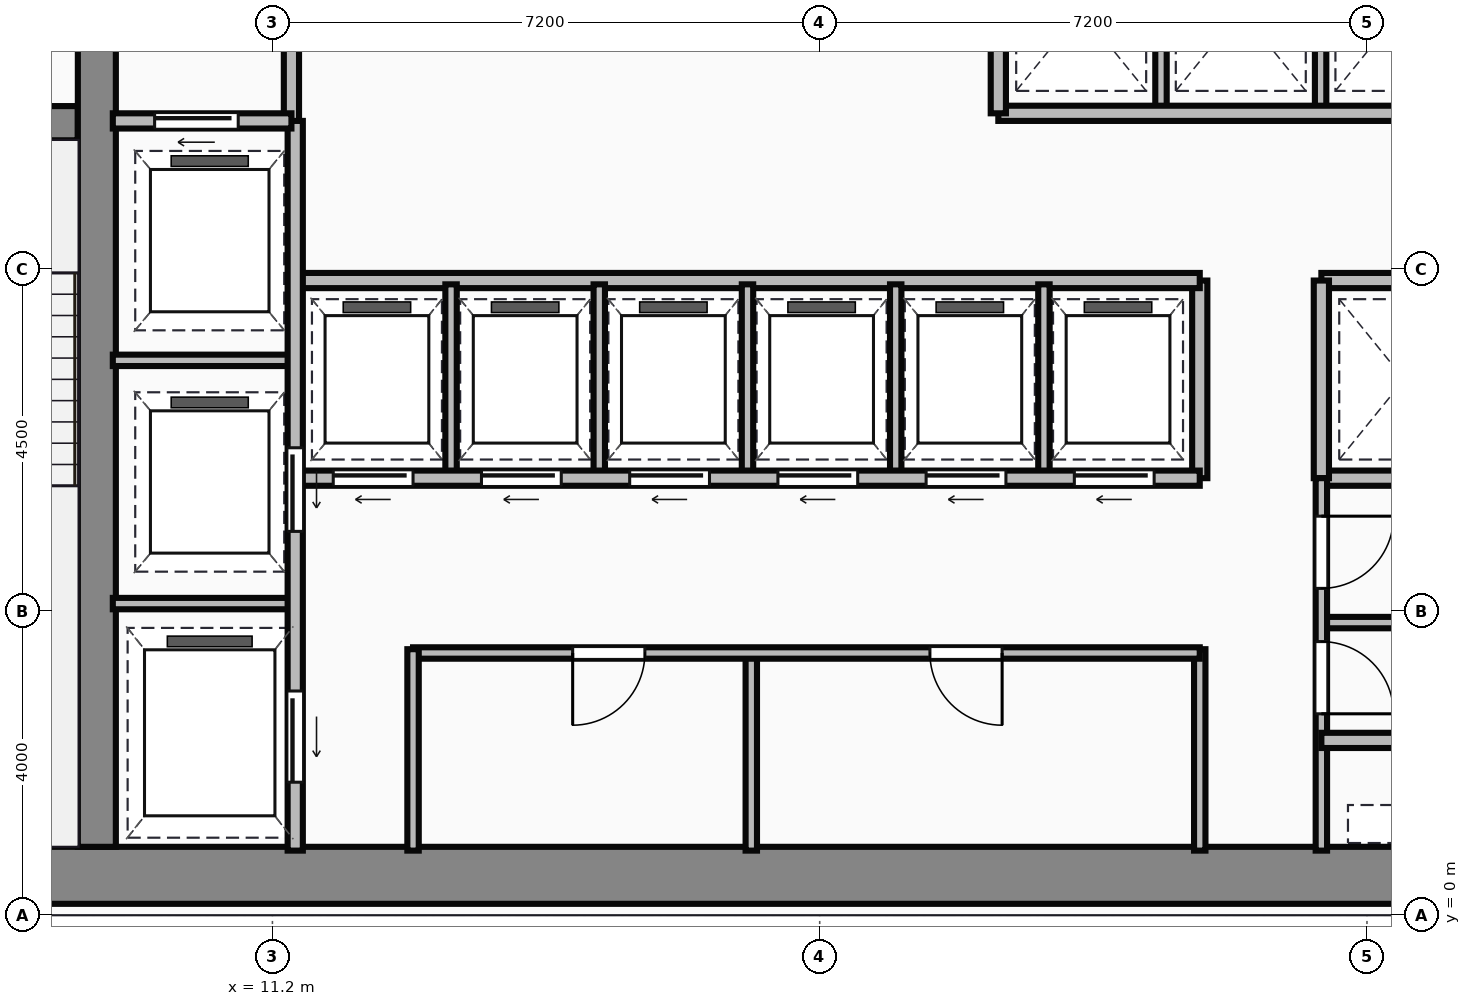
"""IFC4 building model, lengths in metres.
Left out: names, types, materials, properties, quantities, classifications, styles, units other than length and angle.
Written with IfcOpenShell. Run it as: python <this file> out.ifc"""

import sys

from ifc_helpers import new_model, si_unit, direction, frame, frame_2d, origin, place, context, subcontext, project, spatial, rectangle, extrude, source, transform, mapped, element, fill, save


model = new_model("IFC4")
c1 = context("Model", 3, precision=1e-05, world=origin(), true_north=direction((0.0, 1.0)))
c2 = subcontext(c1, "Body", "Model", "MODEL_VIEW")
j1 = project(units=[si_unit("LENGTHUNIT", "METRE"), si_unit("PLANEANGLEUNIT", "RADIAN")], contexts=[c1])
p1 = place(None, origin())
s1 = spatial("IfcSite", under=j1, at=p1, CompositionType="ELEMENT")
p2 = place(p1, origin())
s2 = spatial("IfcBuilding", under=s1, at=p2, CompositionType="ELEMENT")
p3 = place(p2, frame((0.0, 0.0, 95.95)))
s3 = spatial("IfcBuildingStorey", under=s2, at=p3, CompositionType="ELEMENT", Elevation=95.95)
m1 = source(origin(), c2, "Body", "SweptSolid", [
    extrude(rectangle(XDim=29.5, YDim=0.75, at=frame_2d((14.75, 0.0))), origin(), (0.0, 0.0, 1.0), 3.65),
])
p4 = place(p3, frame((4.5, 0.525, 0.0), z_axis=(0.0, 0.0, 1.0), x_axis=(1.0, 0.0, 0.0)))
e1 = element("IfcWall", 1, at=p4, inside=s3, PredefinedType="SHEAR", context=c2, shape_type="MappedRepresentation", body=[
    mapped(m1, transform((0.0, 0.0, 0.0))),
])
m2 = source(origin(), c2, "Body", "SweptSolid", [
    extrude(rectangle(XDim=12.35, YDim=0.5, at=frame_2d((6.175, 0.0))), origin(), (0.0, 0.0, 1.0), 3.65),
])
p5 = place(p3, frame((8.89, 0.9, 0.0), z_axis=(0.0, 0.0, 1.0), x_axis=(0.0, 1.0, 0.0)))
e2 = element("IfcWall", 2, at=p5, inside=s3, PredefinedType="SHEAR", context=c2, shape_type="MappedRepresentation", body=[
    mapped(m2, transform((0.0, 0.0, 0.0))),
])
m3 = source(origin(), c2, "Body", "SweptSolid", [
    extrude(rectangle(XDim=3.39, YDim=0.45, at=frame_2d((1.695, 0.0))), origin(), (0.0, 0.0, 1.0), 3.65),
])
p6 = place(p3, frame((5.25, 10.42, 0.0), z_axis=(0.0, 0.0, 1.0), x_axis=(1.0, 0.0, 0.0)))
e3 = element("IfcWall", 3, at=p6, inside=s3, PredefinedType="SHEAR", context=c2, shape_type="MappedRepresentation", body=[
    mapped(m3, transform((0.0, 0.0, 0.0))),
])
p7 = place(p6, frame((1.05, 0.0, 0.0)))
e4 = element("IfcOpeningElement", 4, at=p7, cuts=e3, PredefinedType="OPENING", context=c2, shape_type="SweptSolid", body=[
    extrude(rectangle(XDim=1.1, YDim=2.15, at=frame_2d((0.55, 1.075))), frame((0.0, 0.235, 0.0), z_axis=(0.0, -1.0, 0.0), x_axis=(1.0, 0.0, 0.0)), (0.0, 0.0, 1.0), 0.47),
])
m4 = source(origin(), c2, "Body", "SweptSolid", [
    extrude(rectangle(XDim=3.18, YDim=0.2, at=frame_2d((1.59, 0.0))), origin(), (0.0, 0.0, 1.0), 3.4),
])
p8 = place(p3, frame((11.45, 10.42, 0.0), z_axis=(0.0, 0.0, 1.0), x_axis=(0.0, 1.0, 0.0)))
e5 = element("IfcWall", 5, at=p8, inside=s3, PredefinedType="PARTITIONING", context=c2, shape_type="MappedRepresentation", body=[
    mapped(m4, transform((0.0, 0.0, 0.0))),
])
m5 = source(origin(), c2, "Body", "SweptSolid", [
    extrude(rectangle(XDim=2.35, YDim=0.2, at=frame_2d((1.175, 0.0))), origin(), (0.0, 0.0, 1.0), 3.4),
])
p9 = place(p3, frame((9.1, 10.45, 0.0), z_axis=(0.0, 0.0, 1.0), x_axis=(1.0, 0.0, 0.0)))
e6 = element("IfcWall", 6, at=p9, inside=s3, PredefinedType="PARTITIONING", context=c2, shape_type="MappedRepresentation", body=[
    mapped(m5, transform((0.0, 0.0, 0.0))),
])
p10 = place(p9, frame((0.55, 0.0, 0.0)))
e7 = element("IfcOpeningElement", 7, at=p10, cuts=e6, PredefinedType="OPENING", context=c2, shape_type="SweptSolid", body=[
    extrude(rectangle(XDim=1.1, YDim=2.15, at=frame_2d((0.55, 1.075))), frame((0.0, 0.11, 0.0), z_axis=(0.0, -1.0, 0.0), x_axis=(1.0, 0.0, 0.0)), (0.0, 0.0, 1.0), 0.22),
])
m6 = source(origin(), c2, "Body", "SweptSolid", [
    extrude(rectangle(XDim=9.6, YDim=0.2, at=frame_2d((4.8, 0.0))), origin(), (0.0, 0.0, 1.0), 3.4),
])
p11 = place(p3, frame((11.5, 0.85, 0.0), z_axis=(0.0, 0.0, 1.0), x_axis=(0.0, 1.0, 0.0)))
e8 = element("IfcWall", 8, at=p11, inside=s3, PredefinedType="PARTITIONING", context=c2, shape_type="MappedRepresentation", body=[
    mapped(m6, transform((0.0, 0.0, 0.0))),
])
p12 = place(p11, frame((4.2, 0.0, 0.0)))
e9 = element("IfcOpeningElement", 9, at=p12, cuts=e8, PredefinedType="OPENING", context=c2, shape_type="SweptSolid", body=[
    extrude(rectangle(XDim=1.1, YDim=2.15, at=frame_2d((0.55, 1.075))), frame((0.0, 0.11, 0.0), z_axis=(0.0, -1.0, 0.0), x_axis=(1.0, 0.0, 0.0)), (0.0, 0.0, 1.0), 0.22),
])
p13 = place(p11, frame((0.9, 0.0, 0.0)))
e10 = element("IfcOpeningElement", 10, at=p13, cuts=e8, PredefinedType="OPENING", context=c2, shape_type="SweptSolid", body=[
    extrude(rectangle(XDim=1.2, YDim=2.15, at=frame_2d((0.6, 1.075))), frame((0.0, 0.11, 0.0), z_axis=(0.0, -1.0, 0.0), x_axis=(1.0, 0.0, 0.0)), (0.0, 0.0, 1.0), 0.22),
])
m7 = source(origin(), c2, "Body", "SweptSolid", [
    extrude(rectangle(XDim=2.4, YDim=0.15, at=frame_2d((1.2, 0.0))), origin(), (0.0, 0.0, 1.0), 3.4),
])
for number, where, z_axis, x_axis in (
    (11, (9.1, 4.1, 0.0), (0.0, 0.0, 1.0), (1.0, 0.0, 0.0)),
    (12, (9.1, 7.3, 0.0), (0.0, 0.0, 1.0), (1.0, 0.0, 0.0)),
):
    element("IfcWall", number, at=place(p3, frame(where, z_axis=z_axis, x_axis=x_axis)), inside=s3, PredefinedType="PARTITIONING", context=c2, shape_type="MappedRepresentation", body=[
        mapped(m7, transform((0.0, 0.0, 0.0))),
    ])
m8 = source(origin(), c2, "Body", "SweptSolid", [
    extrude(rectangle(XDim=2.65, YDim=0.15, at=frame_2d((1.325, 0.0))), origin(), (0.0, 0.0, 1.0), 3.4),
])
p14 = place(p3, frame((13.05, 0.85, 0.0), z_axis=(0.0, 0.0, 1.0), x_axis=(0.0, 1.0, 0.0)))
e13 = element("IfcWall", 13, at=p14, inside=s3, PredefinedType="PARTITIONING", context=c2, shape_type="MappedRepresentation", body=[
    mapped(m8, transform((0.0, 0.0, 0.0))),
])
m9 = source(origin(), c2, "Body", "SweptSolid", [
    extrude(rectangle(XDim=10.35, YDim=0.15, at=frame_2d((5.175, 0.0))), origin(), (0.0, 0.0, 1.0), 3.4),
])
p15 = place(p3, frame((13.05, 3.45, 0.0), z_axis=(0.0, 0.0, 1.0), x_axis=(1.0, 0.0, 0.0)))
e14 = element("IfcWall", 14, at=p15, inside=s3, PredefinedType="PARTITIONING", context=c2, shape_type="MappedRepresentation", body=[
    mapped(m9, transform((0.0, 0.0, 0.0))),
])
p16 = place(p15, frame((2.1, 0.0, 0.0)))
e15 = element("IfcOpeningElement", 15, at=p16, cuts=e14, PredefinedType="OPENING", context=c2, shape_type="SweptSolid", body=[
    extrude(rectangle(XDim=0.95, YDim=2.15, at=frame_2d((0.475, 1.075))), frame((0.0, 0.085, 0.0), z_axis=(0.0, -1.0, 0.0), x_axis=(1.0, 0.0, 0.0)), (0.0, 0.0, 1.0), 0.17),
])
p17 = place(p15, frame((6.8, 0.0, 0.0)))
e16 = element("IfcOpeningElement", 16, at=p17, cuts=e14, PredefinedType="OPENING", context=c2, shape_type="SweptSolid", body=[
    extrude(rectangle(XDim=0.95, YDim=2.15, at=frame_2d((0.475, 1.075))), frame((0.0, 0.085, 0.0), z_axis=(0.0, -1.0, 0.0), x_axis=(1.0, 0.0, 0.0)), (0.0, 0.0, 1.0), 0.17),
])
p18 = place(p3, frame((23.4, 0.85, 0.0), z_axis=(0.0, 0.0, 1.0), x_axis=(0.0, 1.0, 0.0)))
e17 = element("IfcWall", 17, at=p18, inside=s3, PredefinedType="PARTITIONING", context=c2, shape_type="MappedRepresentation", body=[
    mapped(m8, transform((0.0, 0.0, 0.0))),
])
m10 = source(origin(), c2, "Body", "SweptSolid", [
    extrude(rectangle(XDim=2.6, YDim=0.15, at=frame_2d((1.3, 0.0))), origin(), (0.0, 0.0, 1.0), 3.4),
])
p19 = place(p3, frame((17.5, 0.85, 0.0), z_axis=(0.0, 0.0, 1.0), x_axis=(0.0, 1.0, 0.0)))
e18 = element("IfcWall", 18, at=p19, inside=s3, PredefinedType="PARTITIONING", context=c2, shape_type="MappedRepresentation", body=[
    mapped(m10, transform((0.0, 0.0, 0.0))),
])
m11 = source(origin(), c2, "Body", "SweptSolid", [
    extrude(rectangle(XDim=11.85, YDim=0.2, at=frame_2d((5.925, 0.0))), origin(), (0.0, 0.0, 1.0), 3.4),
])
p20 = place(p3, frame((11.55, 5.75, 0.0), z_axis=(0.0, 0.0, 1.0), x_axis=(1.0, 0.0, 0.0)))
e19 = element("IfcWall", 19, at=p20, inside=s3, PredefinedType="PARTITIONING", context=c2, shape_type="MappedRepresentation", body=[
    mapped(m11, transform((0.0, 0.0, 0.0))),
])
p21 = place(p20, frame((0.45, 0.0, 0.0)))
e20 = element("IfcOpeningElement", 20, at=p21, cuts=e19, PredefinedType="OPENING", context=c2, shape_type="SweptSolid", body=[
    extrude(rectangle(XDim=1.05, YDim=2.15, at=frame_2d((0.525, 1.075))), frame((0.0, 0.11, 0.0), z_axis=(0.0, -1.0, 0.0), x_axis=(1.0, 0.0, 0.0)), (0.0, 0.0, 1.0), 0.22),
])
p22 = place(p20, frame((2.4, 0.0, 0.0)))
e21 = element("IfcOpeningElement", 21, at=p22, cuts=e19, PredefinedType="OPENING", context=c2, shape_type="SweptSolid", body=[
    extrude(rectangle(XDim=1.05, YDim=2.15, at=frame_2d((0.525, 1.075))), frame((0.0, 0.11, 0.0), z_axis=(0.0, -1.0, 0.0), x_axis=(1.0, 0.0, 0.0)), (0.0, 0.0, 1.0), 0.22),
])
p23 = place(p20, frame((4.35, 0.0, 0.0)))
e22 = element("IfcOpeningElement", 22, at=p23, cuts=e19, PredefinedType="OPENING", context=c2, shape_type="SweptSolid", body=[
    extrude(rectangle(XDim=1.05, YDim=2.15, at=frame_2d((0.525, 1.075))), frame((0.0, 0.11, 0.0), z_axis=(0.0, -1.0, 0.0), x_axis=(1.0, 0.0, 0.0)), (0.0, 0.0, 1.0), 0.22),
])
p24 = place(p20, frame((6.3, 0.0, 0.0)))
e23 = element("IfcOpeningElement", 23, at=p24, cuts=e19, PredefinedType="OPENING", context=c2, shape_type="SweptSolid", body=[
    extrude(rectangle(XDim=1.05, YDim=2.15, at=frame_2d((0.525, 1.075))), frame((0.0, 0.11, 0.0), z_axis=(0.0, -1.0, 0.0), x_axis=(1.0, 0.0, 0.0)), (0.0, 0.0, 1.0), 0.22),
])
p25 = place(p20, frame((8.25, 0.0, 0.0)))
e24 = element("IfcOpeningElement", 24, at=p25, cuts=e19, PredefinedType="OPENING", context=c2, shape_type="SweptSolid", body=[
    extrude(rectangle(XDim=1.05, YDim=2.15, at=frame_2d((0.525, 1.075))), frame((0.0, 0.11, 0.0), z_axis=(0.0, -1.0, 0.0), x_axis=(1.0, 0.0, 0.0)), (0.0, 0.0, 1.0), 0.22),
])
p26 = place(p20, frame((10.2, 0.0, 0.0)))
e25 = element("IfcOpeningElement", 25, at=p26, cuts=e19, PredefinedType="OPENING", context=c2, shape_type="SweptSolid", body=[
    extrude(rectangle(XDim=1.05, YDim=2.15, at=frame_2d((0.525, 1.075))), frame((0.0, 0.11, 0.0), z_axis=(0.0, -1.0, 0.0), x_axis=(1.0, 0.0, 0.0)), (0.0, 0.0, 1.0), 0.22),
])
p27 = place(p3, frame((11.55, 8.35, 0.0), z_axis=(0.0, 0.0, 1.0), x_axis=(1.0, 0.0, 0.0)))
e26 = element("IfcWall", 26, at=p27, inside=s3, PredefinedType="PARTITIONING", context=c2, shape_type="MappedRepresentation", body=[
    mapped(m11, transform((0.0, 0.0, 0.0))),
])
m12 = source(origin(), c2, "Body", "SweptSolid", [
    extrude(rectangle(XDim=2.6, YDim=0.2, at=frame_2d((1.3, 0.0))), origin(), (0.0, 0.0, 1.0), 3.4),
])
p28 = place(p3, frame((23.4, 5.75, 0.0), z_axis=(0.0, 0.0, 1.0), x_axis=(0.0, 1.0, 0.0)))
e27 = element("IfcWall", 27, at=p28, inside=s3, PredefinedType="PARTITIONING", context=c2, shape_type="MappedRepresentation", body=[
    mapped(m12, transform((0.0, 0.0, 0.0))),
])
m13 = source(origin(), c2, "Body", "SweptSolid", [
    extrude(rectangle(XDim=2.5, YDim=0.15, at=frame_2d((1.25, 0.0))), origin(), (0.0, 0.0, 1.0), 3.4),
])
for number, where, z_axis, x_axis in (
    (28, (13.55, 5.8, 0.0), (0.0, 0.0, 1.0), (0.0, 1.0, 0.0)),
    (29, (15.5, 5.8, 0.0), (0.0, 0.0, 1.0), (0.0, 1.0, 0.0)),
    (30, (17.45, 5.8, 0.0), (0.0, 0.0, 1.0), (0.0, 1.0, 0.0)),
    (31, (19.4, 5.8, 0.0), (0.0, 0.0, 1.0), (0.0, 1.0, 0.0)),
    (32, (21.35, 5.8, 0.0), (0.0, 0.0, 1.0), (0.0, 1.0, 0.0)),
):
    element("IfcWall", number, at=place(p3, frame(where, z_axis=z_axis, x_axis=x_axis)), inside=s3, PredefinedType="PARTITIONING", context=c2, shape_type="MappedRepresentation", body=[
        mapped(m13, transform((0.0, 0.0, 0.0))),
    ])
m14 = source(origin(), c2, "Body", "SweptSolid", [
    extrude(rectangle(XDim=8.8, YDim=0.2, at=frame_2d((4.4, 0.0))), origin(), (0.0, 0.0, 1.0), 3.4),
])
p29 = place(p3, frame((20.75, 10.55, 0.0), z_axis=(0.0, 0.0, 1.0), x_axis=(1.0, 0.0, 0.0)))
e33 = element("IfcWall", 33, at=p29, inside=s3, PredefinedType="PARTITIONING", context=c2, shape_type="MappedRepresentation", body=[
    mapped(m14, transform((0.0, 0.0, 0.0))),
])
m15 = source(origin(), c2, "Body", "SweptSolid", [
    extrude(rectangle(XDim=3.0, YDim=0.2, at=frame_2d((1.5, 0.0))), origin(), (0.0, 0.0, 1.0), 3.4),
])
p30 = place(p3, frame((20.75, 10.55, 0.0), z_axis=(0.0, 0.0, 1.0), x_axis=(0.0, 1.0, 0.0)))
e34 = element("IfcWall", 34, at=p30, inside=s3, PredefinedType="PARTITIONING", context=c2, shape_type="MappedRepresentation", body=[
    mapped(m15, transform((0.0, 0.0, 0.0))),
])
m16 = source(origin(), c2, "Body", "SweptSolid", [
    extrude(rectangle(XDim=2.85, YDim=0.15, at=frame_2d((1.425, 0.0))), origin(), (0.0, 0.0, 1.0), 3.4),
])
for number, where, z_axis, x_axis in (
    (35, (22.89, 10.6, 0.0), (0.0, 0.0, 1.0), (0.0, 1.0, 0.0)),
    (36, (24.99, 10.6, 0.0), (0.0, 0.0, 1.0), (0.0, 1.0, 0.0)),
):
    element("IfcWall", number, at=place(p3, frame(where, z_axis=z_axis, x_axis=x_axis)), inside=s3, PredefinedType="PARTITIONING", context=c2, shape_type="MappedRepresentation", body=[
        mapped(m16, transform((0.0, 0.0, 0.0))),
    ])
m17 = source(origin(), c2, "Body", "SweptSolid", [
    extrude(rectangle(XDim=4.55, YDim=0.2, at=frame_2d((2.275, 0.0))), origin(), (0.0, 0.0, 1.0), 3.4),
])
for number, where, z_axis, x_axis in (
    (37, (25.0, 8.35, 0.0), (0.0, 0.0, 1.0), (1.0, 0.0, 0.0)),
    (38, (25.0, 5.75, 0.0), (0.0, 0.0, 1.0), (1.0, 0.0, 0.0)),
):
    element("IfcWall", number, at=place(p3, frame(where, z_axis=z_axis, x_axis=x_axis)), inside=s3, PredefinedType="PARTITIONING", context=c2, shape_type="MappedRepresentation", body=[
        mapped(m17, transform((0.0, 0.0, 0.0))),
    ])
p31 = place(p3, frame((25.0, 5.75, 0.0), z_axis=(0.0, 0.0, 1.0), x_axis=(0.0, 1.0, 0.0)))
e39 = element("IfcWall", 39, at=p31, inside=s3, PredefinedType="PARTITIONING", context=c2, shape_type="MappedRepresentation", body=[
    mapped(m12, transform((0.0, 0.0, 0.0))),
])
m18 = source(origin(), c2, "Body", "SweptSolid", [
    extrude(rectangle(XDim=4.9, YDim=0.15, at=frame_2d((2.45, 0.0))), origin(), (0.0, 0.0, 1.0), 3.4),
])
p32 = place(p3, frame((25.0, 0.85, 0.0), z_axis=(0.0, 0.0, 1.0), x_axis=(0.0, 1.0, 0.0)))
e40 = element("IfcWall", 40, at=p32, inside=s3, PredefinedType="PARTITIONING", context=c2, shape_type="MappedRepresentation", body=[
    mapped(m18, transform((0.0, 0.0, 0.0))),
])
p33 = place(p32, frame((1.8, 0.0, 0.0)))
e41 = element("IfcOpeningElement", 41, at=p33, cuts=e40, PredefinedType="OPENING", context=c2, shape_type="SweptSolid", body=[
    extrude(rectangle(XDim=0.95, YDim=2.15, at=frame_2d((0.475, 1.075))), frame((0.0, 0.085, 0.0), z_axis=(0.0, -1.0, 0.0), x_axis=(1.0, 0.0, 0.0)), (0.0, 0.0, 1.0), 0.17),
])
p34 = place(p32, frame((3.45, 0.0, 0.0)))
e42 = element("IfcOpeningElement", 42, at=p34, cuts=e40, PredefinedType="OPENING", context=c2, shape_type="SweptSolid", body=[
    extrude(rectangle(XDim=0.95, YDim=2.15, at=frame_2d((0.475, 1.075))), frame((0.0, 0.085, 0.0), z_axis=(0.0, -1.0, 0.0), x_axis=(1.0, 0.0, 0.0)), (0.0, 0.0, 1.0), 0.17),
])
m19 = source(origin(), c2, "Body", "SweptSolid", [
    extrude(rectangle(XDim=2.4, YDim=0.2, at=frame_2d((1.2, 0.0))), origin(), (0.0, 0.0, 1.0), 3.4),
])
p35 = place(p3, frame((25.0, 2.3, 0.0), z_axis=(0.0, 0.0, 1.0), x_axis=(1.0, 0.0, 0.0)))
e43 = element("IfcWall", 43, at=p35, inside=s3, PredefinedType="PARTITIONING", context=c2, shape_type="MappedRepresentation", body=[
    mapped(m19, transform((0.0, 0.0, 0.0))),
])
m20 = source(origin(), c2, "Body", "SweptSolid", [
    extrude(rectangle(XDim=4.55, YDim=0.15, at=frame_2d((2.275, 0.0))), origin(), (0.0, 0.0, 1.0), 3.4),
])
p36 = place(p3, frame((25.0, 3.85, 0.0), z_axis=(0.0, 0.0, 1.0), x_axis=(1.0, 0.0, 0.0)))
e44 = element("IfcWall", 44, at=p36, inside=s3, PredefinedType="PARTITIONING", context=c2, shape_type="MappedRepresentation", body=[
    mapped(m20, transform((0.0, 0.0, 0.0))),
])
m21 = source(origin(), c2, "Body", "SweptSolid", [
    extrude(rectangle(XDim=1.1, YDim=2.15, at=frame_2d((0.55, 1.075))), frame((0.0, 0.025, 0.0), z_axis=(0.0, -1.0, 0.0), x_axis=(1.0, 0.0, 0.0)), (0.0, 0.0, 1.0), 0.05),
])
p37 = place(p10, origin())
e45 = element("IfcDoor", 45, at=p37, inside=s3, OperationType="SLIDING_TO_LEFT", PredefinedType="DOOR", context=c2, shape_type="MappedRepresentation", body=[
    mapped(m21, transform((0.0, 0.0, 0.0))),
])
fill(e7, e45)
p38 = place(p12, frame((1.1, 0.0, 0.0), z_axis=(0.0, 0.0, 1.0), x_axis=(-1.0, 0.0, 0.0)))
e46 = element("IfcDoor", 46, at=p38, inside=s3, OperationType="SLIDING_TO_LEFT", PredefinedType="DOOR", context=c2, shape_type="MappedRepresentation", body=[
    mapped(m21, transform((0.0, 0.0, 0.0))),
])
fill(e9, e46)
m22 = source(origin(), c2, "Body", "SweptSolid", [
    extrude(rectangle(XDim=1.2, YDim=2.15, at=frame_2d((0.6, 1.075))), frame((0.0, 0.025, 0.0), z_axis=(0.0, -1.0, 0.0), x_axis=(1.0, 0.0, 0.0)), (0.0, 0.0, 1.0), 0.05),
])
p39 = place(p13, frame((1.2, 0.0, 0.0), z_axis=(0.0, 0.0, 1.0), x_axis=(-1.0, 0.0, 0.0)))
e47 = element("IfcDoor", 47, at=p39, inside=s3, OperationType="SLIDING_TO_LEFT", PredefinedType="DOOR", context=c2, shape_type="MappedRepresentation", body=[
    mapped(m22, transform((0.0, 0.0, 0.0))),
])
fill(e10, e47)
m23 = source(origin(), c2, "Body", "SweptSolid", [
    extrude(rectangle(XDim=0.95, YDim=2.15, at=frame_2d((0.475, 1.075))), frame((0.0, 0.025, 0.0), z_axis=(0.0, -1.0, 0.0), x_axis=(1.0, 0.0, 0.0)), (0.0, 0.0, 1.0), 0.05),
])
p40 = place(p16, origin())
e48 = element("IfcDoor", 48, at=p40, inside=s3, OperationType="SINGLE_SWING_LEFT", PredefinedType="DOOR", context=c2, shape_type="MappedRepresentation", body=[
    mapped(m23, transform((0.0, 0.0, 0.0))),
])
fill(e15, e48)
p41 = place(p17, origin())
e49 = element("IfcDoor", 49, at=p41, inside=s3, OperationType="SINGLE_SWING_RIGHT", PredefinedType="DOOR", context=c2, shape_type="MappedRepresentation", body=[
    mapped(m23, transform((0.0, 0.0, 0.0))),
])
fill(e16, e49)
m24 = source(origin(), c2, "Body", "SweptSolid", [
    extrude(rectangle(XDim=1.05, YDim=2.15, at=frame_2d((0.525, 1.075))), frame((0.0, 0.025, 0.0), z_axis=(0.0, -1.0, 0.0), x_axis=(1.0, 0.0, 0.0)), (0.0, 0.0, 1.0), 0.05),
])
p42 = place(p21, frame((1.05, 0.0, 0.0), z_axis=(0.0, 0.0, 1.0), x_axis=(-1.0, 0.0, 0.0)))
e50 = element("IfcDoor", 50, at=p42, inside=s3, OperationType="SLIDING_TO_LEFT", PredefinedType="DOOR", context=c2, shape_type="MappedRepresentation", body=[
    mapped(m24, transform((0.0, 0.0, 0.0))),
])
fill(e20, e50)
p43 = place(p22, frame((1.05, 0.0, 0.0), z_axis=(0.0, 0.0, 1.0), x_axis=(-1.0, 0.0, 0.0)))
e51 = element("IfcDoor", 51, at=p43, inside=s3, OperationType="SLIDING_TO_LEFT", PredefinedType="DOOR", context=c2, shape_type="MappedRepresentation", body=[
    mapped(m24, transform((0.0, 0.0, 0.0))),
])
fill(e21, e51)
p44 = place(p23, frame((1.05, 0.0, 0.0), z_axis=(0.0, 0.0, 1.0), x_axis=(-1.0, 0.0, 0.0)))
e52 = element("IfcDoor", 52, at=p44, inside=s3, OperationType="SLIDING_TO_LEFT", PredefinedType="DOOR", context=c2, shape_type="MappedRepresentation", body=[
    mapped(m24, transform((0.0, 0.0, 0.0))),
])
fill(e22, e52)
p45 = place(p24, frame((1.05, 0.0, 0.0), z_axis=(0.0, 0.0, 1.0), x_axis=(-1.0, 0.0, 0.0)))
e53 = element("IfcDoor", 53, at=p45, inside=s3, OperationType="SLIDING_TO_LEFT", PredefinedType="DOOR", context=c2, shape_type="MappedRepresentation", body=[
    mapped(m24, transform((0.0, 0.0, 0.0))),
])
fill(e23, e53)
p46 = place(p25, frame((1.05, 0.0, 0.0), z_axis=(0.0, 0.0, 1.0), x_axis=(-1.0, 0.0, 0.0)))
e54 = element("IfcDoor", 54, at=p46, inside=s3, OperationType="SLIDING_TO_LEFT", PredefinedType="DOOR", context=c2, shape_type="MappedRepresentation", body=[
    mapped(m24, transform((0.0, 0.0, 0.0))),
])
fill(e24, e54)
p47 = place(p26, frame((1.05, 0.0, 0.0), z_axis=(0.0, 0.0, 1.0), x_axis=(-1.0, 0.0, 0.0)))
e55 = element("IfcDoor", 55, at=p47, inside=s3, OperationType="SLIDING_TO_LEFT", PredefinedType="DOOR", context=c2, shape_type="MappedRepresentation", body=[
    mapped(m24, transform((0.0, 0.0, 0.0))),
])
fill(e25, e55)
p48 = place(p33, origin())
e56 = element("IfcDoor", 56, at=p48, inside=s3, OperationType="SINGLE_SWING_LEFT", PredefinedType="DOOR", context=c2, shape_type="MappedRepresentation", body=[
    mapped(m23, transform((0.0, 0.0, 0.0))),
])
fill(e41, e56)
p49 = place(p34, origin())
e57 = element("IfcDoor", 57, at=p49, inside=s3, OperationType="SINGLE_SWING_RIGHT", PredefinedType="DOOR", context=c2, shape_type="MappedRepresentation", body=[
    mapped(m23, transform((0.0, 0.0, 0.0))),
])
fill(e42, e57)
save(model, sys.argv[1])
